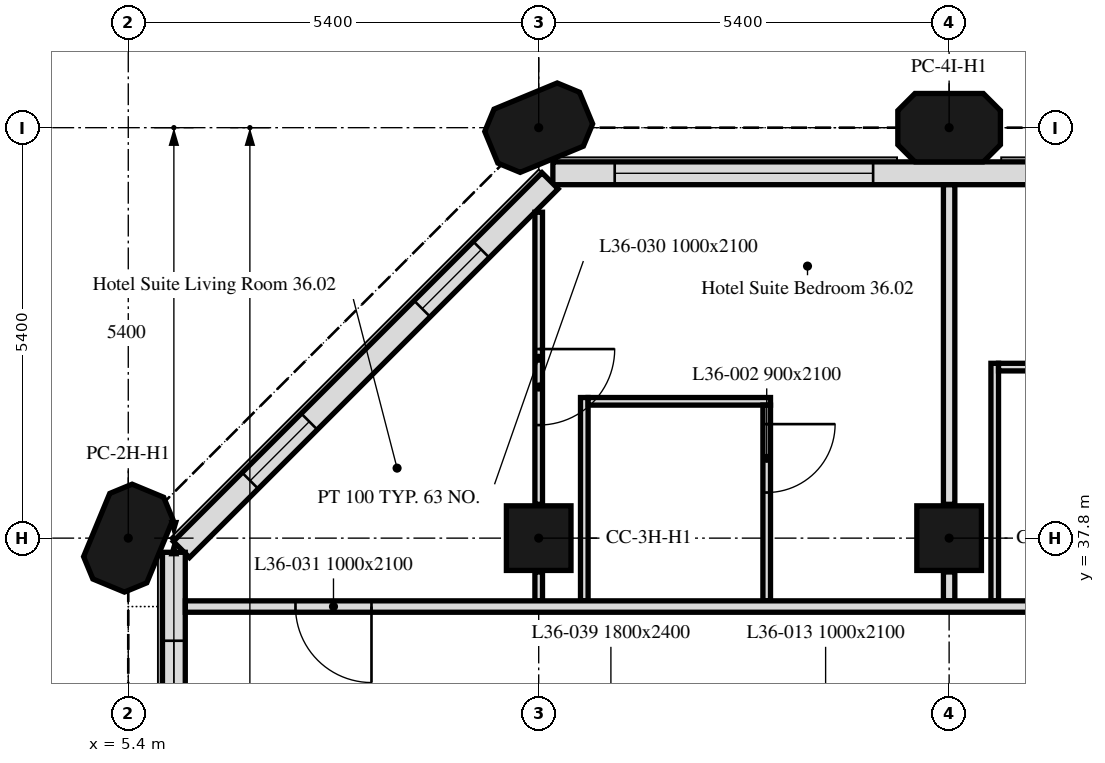
"""IFC4 building model, lengths in metres.
Left out: names, types, materials, properties, quantities, classifications, styles, units other than length and angle.
Written with IfcOpenShell. Run it as: python <this file> out.ifc"""

import sys

from ifc_helpers import new_model, si_unit, direction, frame, frame_2d, origin, origin_2d, place, context, subcontext, project, spatial, polyline, rectangle, outline, extrude, element, fill, save


model = new_model("IFC4")
c1 = context("Model", 3, precision=1e-05, world=origin(), true_north=direction((0.0, 1.0)))
c2 = subcontext(c1, "Body", "Model", "MODEL_VIEW")
j1 = project(units=[si_unit("LENGTHUNIT", "METRE"), si_unit("PLANEANGLEUNIT", "RADIAN")], contexts=[c1])
p1 = place(None, origin())
s1 = spatial("IfcSite", under=j1, at=p1, CompositionType="ELEMENT")
p2 = place(p1, origin())
s2 = spatial("IfcBuilding", under=s1, at=p2, CompositionType="ELEMENT")
p3 = place(p2, frame((0.0, 0.0, 156.1)))
s3 = spatial("IfcBuildingStorey", under=s2, at=p3, CompositionType="ELEMENT", Elevation=156.1)
p4 = place(p3, frame((5.4, 37.8, 0.0), z_axis=(0.0, 0.0, 1.0), x_axis=(0.382683432365, 0.923879532511, 0.0)))
e1 = element("IfcColumn", 1, at=p4, inside=s3, PredefinedType="COLUMN", context=c2, shape_type="SweptSolid", body=[
    extrude(outline(polyline([(-0.45, -0.45), (0.45, -0.45), (0.675, -0.225), (0.675, 0.225), (0.45, 0.45), (-0.45, 0.45), (-0.675, 0.225), (-0.675, -0.225), (-0.45, -0.45)])), origin(), (0.0, 0.0, 1.0), 3.0),
])
for number, where, z_axis, x_axis in (
    (2, (10.8, 37.8, 0.0), (0.0, 0.0, 1.0), (1.0, 0.0, 0.0)),
    (3, (16.2, 37.8, 0.0), (0.0, 0.0, 1.0), (1.0, 0.0, 0.0)),
):
    element("IfcColumn", number, at=place(p3, frame(where, z_axis=z_axis, x_axis=x_axis)), inside=s3, PredefinedType="COLUMN", context=c2, shape_type="SweptSolid", body=[
        extrude(rectangle(XDim=0.85, YDim=0.85, at=origin_2d()), origin(), (0.0, 0.0, 1.0), 3.0),
    ])
for number, where, z_axis, x_axis in (
    (4, (10.8, 43.2, 0.0), (0.0, 0.0, 1.0), (0.924, 0.383, 0.0)),
    (5, (16.2, 43.2, 0.0), (0.0, 0.0, 1.0), (1.0, 0.0, 0.0)),
):
    element("IfcColumn", number, at=place(p3, frame(where, z_axis=z_axis, x_axis=x_axis)), inside=s3, PredefinedType="COLUMN", context=c2, shape_type="SweptSolid", body=[
        extrude(outline(polyline([(-0.45, -0.45), (0.45, -0.45), (0.675, -0.225), (0.675, 0.225), (0.45, 0.45), (-0.45, 0.45), (-0.675, 0.225), (-0.675, -0.225), (-0.45, -0.45)])), origin(), (0.0, 0.0, 1.0), 3.0),
    ])
p5 = place(p3, frame((43.014, 42.6, 0.0), z_axis=(0.0, 0.0, 1.0), x_axis=(-1.0, 0.0, 0.0)))
e6 = element("IfcWall", 6, at=p5, inside=s3, PredefinedType="SOLIDWALL", context=c2, shape_type="SweptSolid", body=[
    extrude(rectangle(XDim=32.027, YDim=0.3, at=frame_2d((16.014, 0.0))), origin(), (0.0, 0.0, 1.0), 3.0),
])
p6 = place(p5, frame((2.764, 0.0, 0.9)))
e7 = element("IfcOpeningElement", 7, at=p6, cuts=e6, PredefinedType="OPENING", context=c2, shape_type="SweptSolid", body=[
    extrude(rectangle(XDim=1.1, YDim=1.7, at=frame_2d((0.55, 0.85))), frame((0.0, 0.16, 0.0), z_axis=(0.0, -1.0, 0.0), x_axis=(1.0, 0.0, 0.0)), (0.0, 0.0, 1.0), 0.32),
])
p7 = place(p5, frame((6.214, 0.0, 0.9)))
e8 = element("IfcOpeningElement", 8, at=p7, cuts=e6, PredefinedType="OPENING", context=c2, shape_type="SweptSolid", body=[
    extrude(rectangle(XDim=3.4, YDim=1.7, at=frame_2d((1.7, 0.85))), frame((0.0, 0.16, 0.0), z_axis=(0.0, -1.0, 0.0), x_axis=(1.0, 0.0, 0.0)), (0.0, 0.0, 1.0), 0.32),
])
p8 = place(p5, frame((13.564, 0.0, 0.9)))
e9 = element("IfcOpeningElement", 9, at=p8, cuts=e6, PredefinedType="OPENING", context=c2, shape_type="SweptSolid", body=[
    extrude(rectangle(XDim=1.1, YDim=1.7, at=frame_2d((0.55, 0.85))), frame((0.0, 0.16, 0.0), z_axis=(0.0, -1.0, 0.0), x_axis=(1.0, 0.0, 0.0)), (0.0, 0.0, 1.0), 0.32),
])
p9 = place(p5, frame((17.014, 0.0, 0.9)))
e10 = element("IfcOpeningElement", 10, at=p9, cuts=e6, PredefinedType="OPENING", context=c2, shape_type="SweptSolid", body=[
    extrude(rectangle(XDim=3.4, YDim=1.7, at=frame_2d((1.7, 0.85))), frame((0.0, 0.16, 0.0), z_axis=(0.0, -1.0, 0.0), x_axis=(1.0, 0.0, 0.0)), (0.0, 0.0, 1.0), 0.32),
])
p10 = place(p5, frame((24.364, 0.0, 0.9)))
e11 = element("IfcOpeningElement", 11, at=p10, cuts=e6, PredefinedType="OPENING", context=c2, shape_type="SweptSolid", body=[
    extrude(rectangle(XDim=1.1, YDim=1.7, at=frame_2d((0.55, 0.85))), frame((0.0, 0.16, 0.0), z_axis=(0.0, -1.0, 0.0), x_axis=(1.0, 0.0, 0.0)), (0.0, 0.0, 1.0), 0.32),
])
p11 = place(p5, frame((27.814, 0.0, 0.9)))
e12 = element("IfcOpeningElement", 12, at=p11, cuts=e6, PredefinedType="OPENING", context=c2, shape_type="SweptSolid", body=[
    extrude(rectangle(XDim=3.4, YDim=1.7, at=frame_2d((1.7, 0.85))), frame((0.0, 0.16, 0.0), z_axis=(0.0, -1.0, 0.0), x_axis=(1.0, 0.0, 0.0)), (0.0, 0.0, 1.0), 0.32),
])
p12 = place(p3, frame((10.949, 42.501, 0.0), z_axis=(0.0, 0.0, 1.0), x_axis=(-0.707106781187, -0.707106781187, 0.0)))
e13 = element("IfcWall", 13, at=p12, inside=s3, PredefinedType="SOLIDWALL", context=c2, shape_type="SweptSolid", body=[
    extrude(rectangle(XDim=6.86, YDim=0.3, at=frame_2d((3.43, 0.0))), origin(), (0.0, 0.0, 1.0), 3.0),
])
p13 = place(p12, frame((1.28, 0.0, 0.9)))
e14 = element("IfcOpeningElement", 14, at=p13, cuts=e13, PredefinedType="OPENING", context=c2, shape_type="SweptSolid", body=[
    extrude(rectangle(XDim=1.1, YDim=1.7, at=frame_2d((0.55, 0.85))), frame((0.0, 0.16, 0.0), z_axis=(0.0, -1.0, 0.0), x_axis=(1.0, 0.0, 0.0)), (0.0, 0.0, 1.0), 0.32),
])
p14 = place(p12, frame((4.48, 0.0, 0.9)))
e15 = element("IfcOpeningElement", 15, at=p14, cuts=e13, PredefinedType="OPENING", context=c2, shape_type="SweptSolid", body=[
    extrude(rectangle(XDim=1.1, YDim=1.7, at=frame_2d((0.55, 0.85))), frame((0.0, 0.16, 0.0), z_axis=(0.0, -1.0, 0.0), x_axis=(1.0, 0.0, 0.0)), (0.0, 0.0, 1.0), 0.32),
])
p15 = place(p3, frame((6.0, 37.614, 0.0), z_axis=(0.0, 0.0, 1.0), x_axis=(0.0, -1.0, 0.0)))
e16 = element("IfcWall", 16, at=p15, inside=s3, PredefinedType="SOLIDWALL", context=c2, shape_type="SweptSolid", body=[
    extrude(rectangle(XDim=5.214, YDim=0.3, at=frame_2d((2.607, 0.0))), origin(), (0.0, 0.0, 1.0), 3.0),
])
p16 = place(p15, frame((1.164, 0.0, 0.9)))
e17 = element("IfcOpeningElement", 17, at=p16, cuts=e16, PredefinedType="OPENING", context=c2, shape_type="SweptSolid", body=[
    extrude(rectangle(XDim=1.1, YDim=1.7, at=frame_2d((0.55, 0.85))), frame((0.0, 0.16, 0.0), z_axis=(0.0, -1.0, 0.0), x_axis=(1.0, 0.0, 0.0)), (0.0, 0.0, 1.0), 0.32),
])
p17 = place(p15, frame((2.764, 0.0, 0.9)))
e18 = element("IfcOpeningElement", 18, at=p17, cuts=e16, PredefinedType="OPENING", context=c2, shape_type="SweptSolid", body=[
    extrude(rectangle(XDim=1.1, YDim=1.7, at=frame_2d((0.55, 0.85))), frame((0.0, 0.16, 0.0), z_axis=(0.0, -1.0, 0.0), x_axis=(1.0, 0.0, 0.0)), (0.0, 0.0, 1.0), 0.32),
])
p18 = place(p3, frame((10.8, 42.088, 0.0), z_axis=(0.0, 0.0, 1.0), x_axis=(0.0, -1.0, 0.0)))
e19 = element("IfcWall", 19, at=p18, inside=s3, PredefinedType="PARTITIONING", context=c2, shape_type="SweptSolid", body=[
    extrude(rectangle(XDim=3.843, YDim=0.1, at=frame_2d((1.921, 0.0))), origin(), (0.0, 0.0, 1.0), 3.0),
])
p19 = place(p18, frame((1.8, 0.0, 0.0)))
e20 = element("IfcOpeningElement", 20, at=p19, cuts=e19, PredefinedType="OPENING", context=c2, shape_type="SweptSolid", body=[
    extrude(rectangle(XDim=1.0, YDim=2.1, at=frame_2d((0.5, 1.05))), frame((0.0, 0.05, 0.0), z_axis=(0.0, -1.0, 0.0), x_axis=(1.0, 0.0, 0.0)), (0.0, 0.0, 1.0), 0.1),
])
p20 = place(p3, frame((10.8, 37.355, 0.0), z_axis=(0.0, 0.0, 1.0), x_axis=(0.0, -1.0, 0.0)))
e21 = element("IfcWall", 21, at=p20, inside=s3, PredefinedType="PARTITIONING", context=c2, shape_type="SweptSolid", body=[
    extrude(rectangle(XDim=0.38, YDim=0.1, at=frame_2d((0.19, 0.0))), origin(), (0.0, 0.0, 1.0), 3.0),
])
p21 = place(p3, frame((11.4, 36.975, 0.0), z_axis=(0.0, 0.0, 1.0), x_axis=(0.0, 1.0, 0.0)))
e22 = element("IfcWall", 22, at=p21, inside=s3, PredefinedType="PARTITIONING", context=c2, shape_type="SweptSolid", body=[
    extrude(rectangle(XDim=2.675, YDim=0.1, at=frame_2d((1.337, 0.0))), origin(), (0.0, 0.0, 1.0), 3.0),
])
p22 = place(p3, frame((11.45, 39.6, 0.0), z_axis=(0.0, 0.0, 1.0), x_axis=(1.0, 0.0, 0.0)))
e23 = element("IfcWall", 23, at=p22, inside=s3, PredefinedType="PARTITIONING", context=c2, shape_type="SweptSolid", body=[
    extrude(rectangle(XDim=2.4, YDim=0.1, at=frame_2d((1.2, 0.0))), origin(), (0.0, 0.0, 1.0), 3.0),
])
p23 = place(p3, frame((13.8, 39.55, 0.0), z_axis=(0.0, 0.0, 1.0), x_axis=(0.0, -1.0, 0.0)))
e24 = element("IfcWall", 24, at=p23, inside=s3, PredefinedType="PARTITIONING", context=c2, shape_type="SweptSolid", body=[
    extrude(rectangle(XDim=2.575, YDim=0.1, at=frame_2d((1.288, 0.0))), origin(), (0.0, 0.0, 1.0), 3.0),
])
p24 = place(p23, frame((0.25, 0.0, 0.0)))
e25 = element("IfcOpeningElement", 25, at=p24, cuts=e24, PredefinedType="OPENING", context=c2, shape_type="SweptSolid", body=[
    extrude(rectangle(XDim=0.9, YDim=2.1, at=frame_2d((0.45, 1.05))), frame((0.0, 0.05, 0.0), z_axis=(0.0, -1.0, 0.0), x_axis=(1.0, 0.0, 0.0)), (0.0, 0.0, 1.0), 0.1),
])
p25 = place(p3, frame((16.2, 36.975, 0.0), z_axis=(0.0, 0.0, 1.0), x_axis=(0.0, 1.0, 0.0)))
e26 = element("IfcWall", 26, at=p25, inside=s3, PredefinedType="PARTITIONING", context=c2, shape_type="SweptSolid", body=[
    extrude(rectangle(XDim=0.38, YDim=0.15, at=frame_2d((0.19, 0.0))), origin(), (0.0, 0.0, 1.0), 3.0),
])
p26 = place(p3, frame((16.2, 38.245, 0.0), z_axis=(0.0, 0.0, 1.0), x_axis=(0.0, 1.0, 0.0)))
e27 = element("IfcWall", 27, at=p26, inside=s3, PredefinedType="PARTITIONING", context=c2, shape_type="SweptSolid", body=[
    extrude(rectangle(XDim=4.204, YDim=0.15, at=frame_2d((2.102, 0.0))), origin(), (0.0, 0.0, 1.0), 3.0),
])
p27 = place(p3, frame((16.8, 36.975, 0.0), z_axis=(0.0, 0.0, 1.0), x_axis=(0.0, 1.0, 0.0)))
e28 = element("IfcWall", 28, at=p27, inside=s3, PredefinedType="PARTITIONING", context=c2, shape_type="SweptSolid", body=[
    extrude(rectangle(XDim=3.125, YDim=0.1, at=frame_2d((1.562, 0.0))), origin(), (0.0, 0.0, 1.0), 3.0),
])
p28 = place(p3, frame((16.85, 40.05, 0.0), z_axis=(0.0, 0.0, 1.0), x_axis=(1.0, 0.0, 0.0)))
e29 = element("IfcWall", 29, at=p28, inside=s3, PredefinedType="PARTITIONING", context=c2, shape_type="SweptSolid", body=[
    extrude(rectangle(XDim=2.1, YDim=0.1, at=frame_2d((1.05, 0.0))), origin(), (0.0, 0.0, 1.0), 3.0),
])
p29 = place(p3, frame((47.849, 36.9, 0.0), z_axis=(0.0, 0.0, 1.0), x_axis=(-1.0, 0.0, 0.0)))
e30 = element("IfcWall", 30, at=p29, inside=s3, PredefinedType="PARTITIONING", context=c2, shape_type="SweptSolid", body=[
    extrude(rectangle(XDim=41.698, YDim=0.15, at=frame_2d((20.849, 0.0))), origin(), (0.0, 0.0, 1.0), 3.0),
])
p30 = place(p29, frame((39.249, 0.0, 0.0)))
e31 = element("IfcOpeningElement", 31, at=p30, cuts=e30, PredefinedType="OPENING", context=c2, shape_type="SweptSolid", body=[
    extrude(rectangle(XDim=1.0, YDim=2.1, at=frame_2d((0.5, 1.05))), frame((0.0, 0.075, 0.0), z_axis=(0.0, -1.0, 0.0), x_axis=(1.0, 0.0, 0.0)), (0.0, 0.0, 1.0), 0.15),
])
p31 = place(p29, frame((27.649, 0.0, 0.0)))
e32 = element("IfcOpeningElement", 32, at=p31, cuts=e30, PredefinedType="OPENING", context=c2, shape_type="SweptSolid", body=[
    extrude(rectangle(XDim=1.0, YDim=2.1, at=frame_2d((0.5, 1.05))), frame((0.0, 0.075, 0.0), z_axis=(0.0, -1.0, 0.0), x_axis=(1.0, 0.0, 0.0)), (0.0, 0.0, 1.0), 0.15),
])
p32 = place(p29, frame((22.249, 0.0, 0.0)))
e33 = element("IfcOpeningElement", 33, at=p32, cuts=e30, PredefinedType="OPENING", context=c2, shape_type="SweptSolid", body=[
    extrude(rectangle(XDim=1.0, YDim=2.1, at=frame_2d((0.5, 1.05))), frame((0.0, 0.075, 0.0), z_axis=(0.0, -1.0, 0.0), x_axis=(1.0, 0.0, 0.0)), (0.0, 0.0, 1.0), 0.15),
])
p33 = place(p29, frame((16.849, 0.0, 0.0)))
e34 = element("IfcOpeningElement", 34, at=p33, cuts=e30, PredefinedType="OPENING", context=c2, shape_type="SweptSolid", body=[
    extrude(rectangle(XDim=1.0, YDim=2.1, at=frame_2d((0.5, 1.05))), frame((0.0, 0.075, 0.0), z_axis=(0.0, -1.0, 0.0), x_axis=(1.0, 0.0, 0.0)), (0.0, 0.0, 1.0), 0.15),
])
p34 = place(p29, frame((11.449, 0.0, 0.0)))
e35 = element("IfcOpeningElement", 35, at=p34, cuts=e30, PredefinedType="OPENING", context=c2, shape_type="SweptSolid", body=[
    extrude(rectangle(XDim=1.0, YDim=2.1, at=frame_2d((0.5, 1.05))), frame((0.0, 0.075, 0.0), z_axis=(0.0, -1.0, 0.0), x_axis=(1.0, 0.0, 0.0)), (0.0, 0.0, 1.0), 0.15),
])
p35 = place(p29, frame((2.744, 0.0, 0.0)))
e36 = element("IfcOpeningElement", 36, at=p35, cuts=e30, PredefinedType="OPENING", context=c2, shape_type="SweptSolid", body=[
    extrude(rectangle(XDim=1.0, YDim=2.1, at=frame_2d((0.5, 1.05))), frame((0.0, 0.075, 0.0), z_axis=(0.0, -1.0, 0.0), x_axis=(1.0, 0.0, 0.0)), (0.0, 0.0, 1.0), 0.15),
])
p36 = place(p11, origin())
e37 = element("IfcWindow", 37, at=p36, inside=s3, PartitioningType="SINGLE_PANEL", PredefinedType="WINDOW", context=c2, shape_type="SweptSolid", body=[
    extrude(rectangle(XDim=3.4, YDim=1.7, at=frame_2d((1.7, 0.85))), frame((0.0, 0.03, 0.0), z_axis=(0.0, -1.0, 0.0), x_axis=(1.0, 0.0, 0.0)), (0.0, 0.0, 1.0), 0.06),
])
fill(e12, e37)
p37 = place(p13, origin())
e38 = element("IfcWindow", 38, at=p37, inside=s3, PartitioningType="SINGLE_PANEL", PredefinedType="WINDOW", context=c2, shape_type="SweptSolid", body=[
    extrude(rectangle(XDim=1.1, YDim=1.7, at=frame_2d((0.55, 0.85))), frame((0.0, 0.03, 0.0), z_axis=(0.0, -1.0, 0.0), x_axis=(1.0, 0.0, 0.0)), (0.0, 0.0, 1.0), 0.06),
])
fill(e14, e38)
p38 = place(p14, origin())
e39 = element("IfcWindow", 39, at=p38, inside=s3, PartitioningType="SINGLE_PANEL", PredefinedType="WINDOW", context=c2, shape_type="SweptSolid", body=[
    extrude(rectangle(XDim=1.1, YDim=1.7, at=frame_2d((0.55, 0.85))), frame((0.0, 0.03, 0.0), z_axis=(0.0, -1.0, 0.0), x_axis=(1.0, 0.0, 0.0)), (0.0, 0.0, 1.0), 0.06),
])
fill(e15, e39)
p39 = place(p16, origin())
e40 = element("IfcWindow", 40, at=p39, inside=s3, PartitioningType="SINGLE_PANEL", PredefinedType="WINDOW", context=c2, shape_type="SweptSolid", body=[
    extrude(rectangle(XDim=1.1, YDim=1.7, at=frame_2d((0.55, 0.85))), frame((0.0, 0.03, 0.0), z_axis=(0.0, -1.0, 0.0), x_axis=(1.0, 0.0, 0.0)), (0.0, 0.0, 1.0), 0.06),
])
fill(e17, e40)
p40 = place(p24, origin())
e41 = element("IfcDoor", 41, at=p40, inside=s3, OperationType="SINGLE_SWING_RIGHT", PredefinedType="DOOR", context=c2, shape_type="SweptSolid", body=[
    extrude(rectangle(XDim=0.9, YDim=2.1, at=frame_2d((0.45, 1.05))), frame((0.0, 0.025, 0.0), z_axis=(0.0, -1.0, 0.0), x_axis=(1.0, 0.0, 0.0)), (0.0, 0.0, 1.0), 0.05),
])
fill(e25, e41)
p41 = place(p19, origin())
e42 = element("IfcDoor", 42, at=p41, inside=s3, OperationType="SINGLE_SWING_RIGHT", PredefinedType="DOOR", context=c2, shape_type="SweptSolid", body=[
    extrude(rectangle(XDim=1.0, YDim=2.1, at=frame_2d((0.5, 1.05))), frame((0.0, 0.025, 0.0), z_axis=(0.0, -1.0, 0.0), x_axis=(1.0, 0.0, 0.0)), (0.0, 0.0, 1.0), 0.05),
])
fill(e20, e42)
p42 = place(p30, origin())
e43 = element("IfcDoor", 43, at=p42, inside=s3, OperationType="SINGLE_SWING_LEFT", PredefinedType="DOOR", context=c2, shape_type="SweptSolid", body=[
    extrude(rectangle(XDim=1.0, YDim=2.1, at=frame_2d((0.5, 1.05))), frame((0.0, 0.025, 0.0), z_axis=(0.0, -1.0, 0.0), x_axis=(1.0, 0.0, 0.0)), (0.0, 0.0, 1.0), 0.05),
])
fill(e31, e43)
save(model, sys.argv[1])
